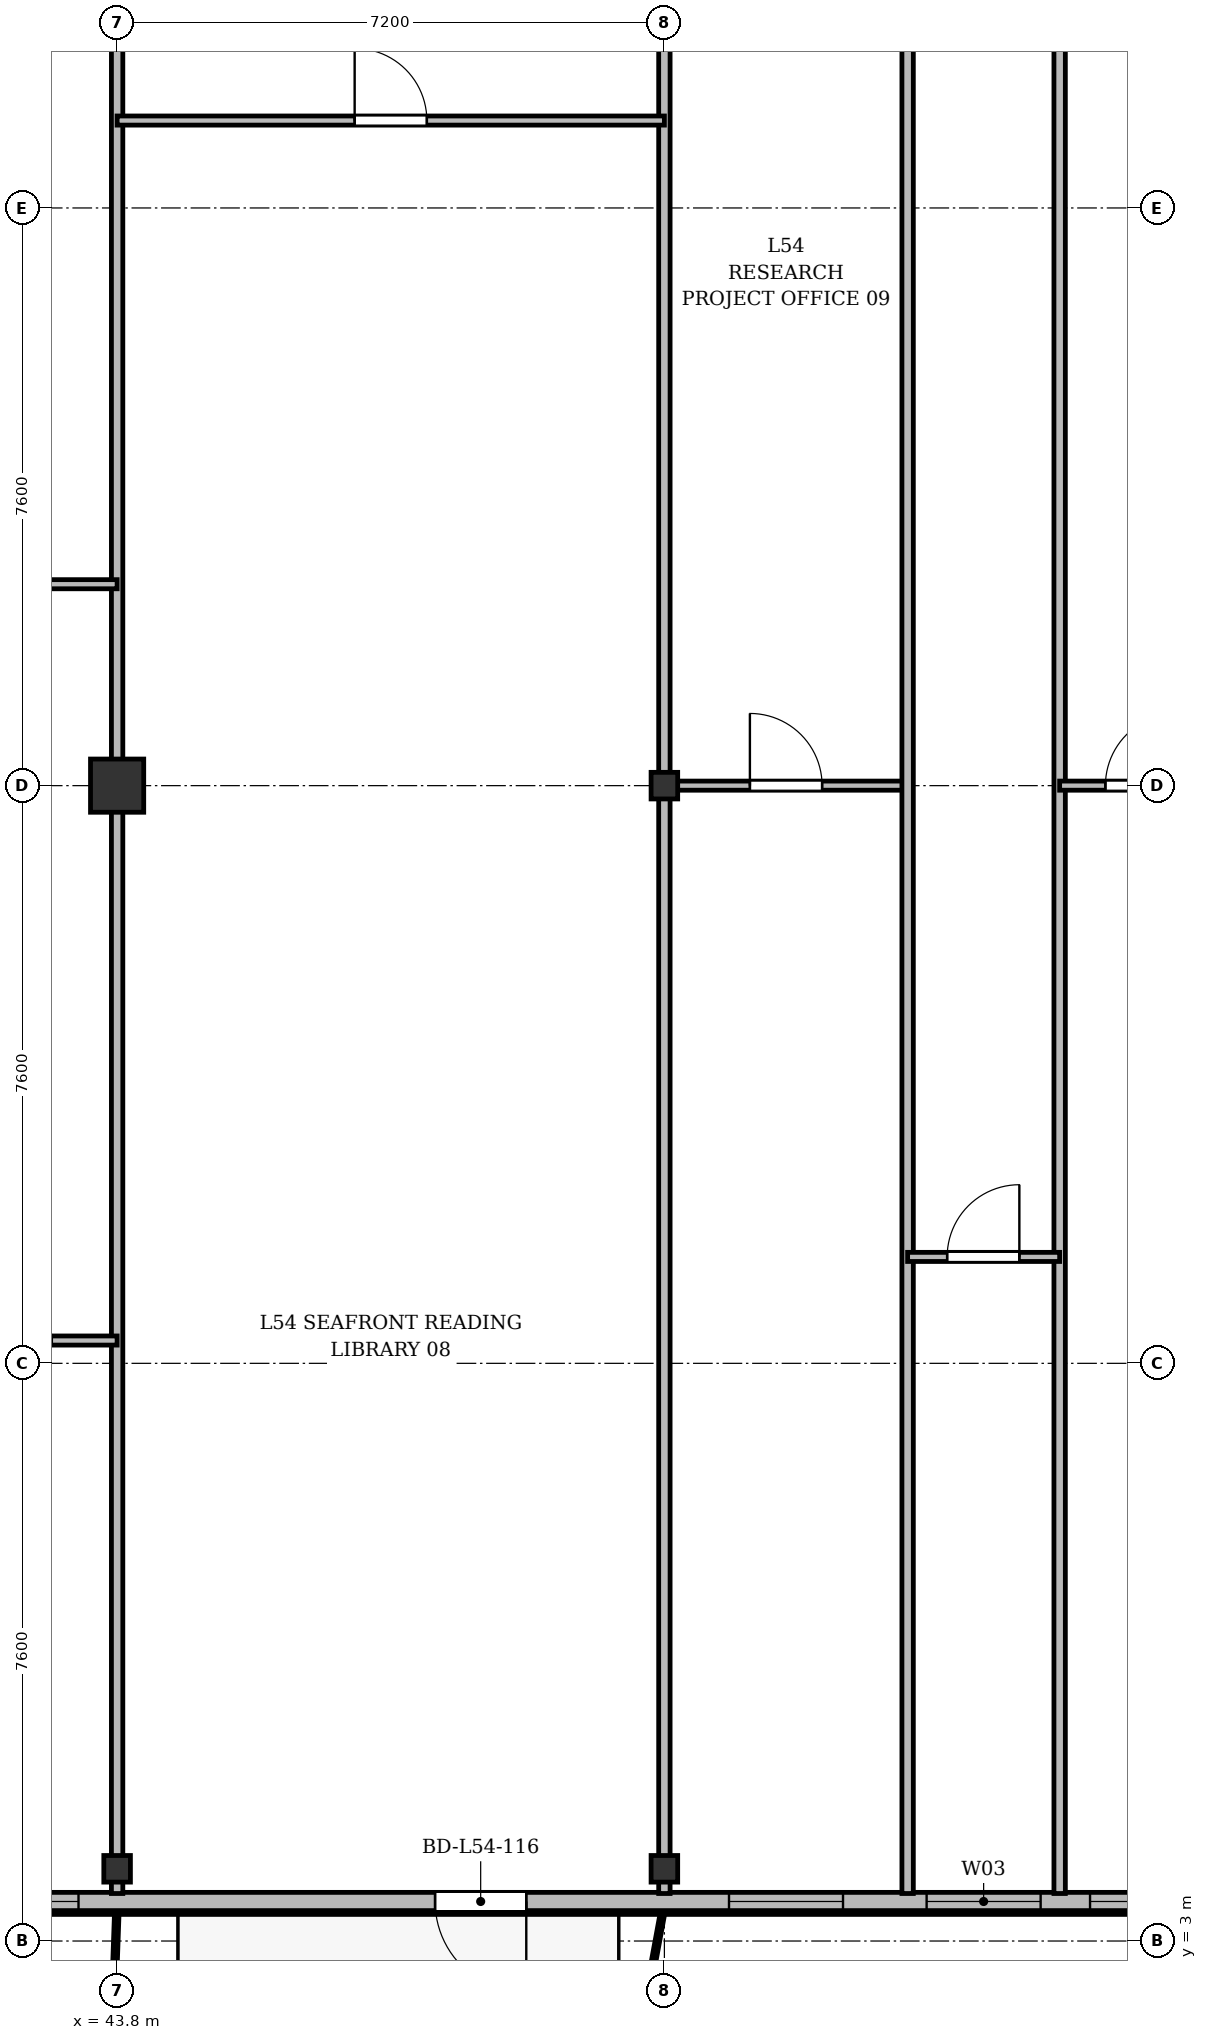
"""IFC4 building model, lengths in metres.
Left out: names, types, materials, properties, quantities, classifications, styles, units other than length and angle.
Written with IfcOpenShell. Run it as: python <this file> out.ifc"""

import sys

from ifc_helpers import new_model, si_unit, direction, frame, frame_2d, origin, origin_2d, place, context, subcontext, project, spatial, rectangle, i_section, extrude, source, transform, mapped, element, fill, save


model = new_model("IFC4")
c1 = context("Model", 3, precision=1e-05, world=origin(), true_north=direction((0.0, 1.0)))
c2 = subcontext(c1, "Body", "Model", "MODEL_VIEW")
j1 = project(units=[si_unit("LENGTHUNIT", "METRE"), si_unit("PLANEANGLEUNIT", "RADIAN")], contexts=[c1])
p1 = place(None, origin())
s1 = spatial("IfcSite", under=j1, at=p1, CompositionType="ELEMENT")
p2 = place(p1, origin())
s2 = spatial("IfcBuilding", under=s1, at=p2, CompositionType="ELEMENT")
p3 = place(p2, frame((0.0, 0.0, 208.5)))
s3 = spatial("IfcBuildingStorey", under=s2, at=p3, CompositionType="ELEMENT", Elevation=208.5)
m1 = source(origin(), c2, "Body", "SweptSolid", [
    extrude(i_section(OverallWidth=0.35, OverallDepth=0.35, WebThickness=0.018, FlangeThickness=0.028, at=origin_2d()), origin(), (0.0, 0.0, 1.0), 3.6),
])
p4 = place(p3, frame((43.8, 3.95, 0.0), z_axis=(0.0, 0.0, 1.0), x_axis=(1.0, 0.0, 0.0)))
e1 = element("IfcColumn", 1, at=p4, inside=s3, PredefinedType="COLUMN", context=c2, shape_type="MappedRepresentation", body=[
    mapped(m1, transform((0.0, 0.0, 0.0), x_axis=(1.0, 0.0, 0.0), y_axis=(0.0, 1.0, 0.0), z_axis=(0.0, 0.0, 1.0), scale=1.0)),
])
m2 = source(origin(), c2, "Body", "SweptSolid", [
    extrude(rectangle(XDim=0.7, YDim=0.7, at=origin_2d()), origin(), (0.0, 0.0, 1.0), 3.6),
])
p5 = place(p3, frame((43.8, 18.2, 0.0), z_axis=(0.0, 0.0, 1.0), x_axis=(1.0, 0.0, 0.0)))
e2 = element("IfcColumn", 2, at=p5, inside=s3, PredefinedType="COLUMN", context=c2, shape_type="MappedRepresentation", body=[
    mapped(m2, transform((0.0, 0.0, 0.0), x_axis=(1.0, 0.0, 0.0), y_axis=(0.0, 1.0, 0.0), z_axis=(0.0, 0.0, 1.0), scale=1.0)),
])
for number, where, z_axis, x_axis in (
    (3, (51.0, 3.95, 0.0), (0.0, 0.0, 1.0), (1.0, 0.0, 0.0)),
    (4, (51.0, 18.2, 0.0), (0.0, 0.0, 1.0), (1.0, 0.0, 0.0)),
):
    element("IfcColumn", number, at=place(p3, frame(where, z_axis=z_axis, x_axis=x_axis)), inside=s3, PredefinedType="COLUMN", context=c2, shape_type="MappedRepresentation", body=[
        mapped(m1, transform((0.0, 0.0, 0.0), x_axis=(1.0, 0.0, 0.0), y_axis=(0.0, 1.0, 0.0), z_axis=(0.0, 0.0, 1.0), scale=1.0)),
    ])
p6 = place(p3, frame((63.4, 3.52, 0.0), z_axis=(0.0, 0.0, 1.0), x_axis=(-1.0, 0.0, 0.0)))
e5 = element("IfcWall", 5, at=p6, inside=s3, PredefinedType="SOLIDWALL", context=c2, shape_type="SweptSolid", body=[
    extrude(rectangle(XDim=52.4, YDim=0.24, at=frame_2d((26.2, 0.0))), origin(), (0.0, 0.0, 1.0), 3.36),
])
p7 = place(p6, frame((1.52, 0.0, 0.9)))
e6 = element("IfcOpeningElement", 6, at=p7, cuts=e5, PredefinedType="OPENING", context=c2, shape_type="SweptSolid", body=[
    extrude(rectangle(XDim=1.65, YDim=1.85, at=frame_2d((0.825, 0.925))), frame((0.0, 0.13, 0.0), z_axis=(0.0, -1.0, 0.0), x_axis=(1.0, 0.0, 0.0)), (0.0, 0.0, 1.0), 0.26),
])
p8 = place(p6, frame((5.0, 0.0, 0.9)))
e7 = element("IfcOpeningElement", 7, at=p8, cuts=e5, PredefinedType="OPENING", context=c2, shape_type="SweptSolid", body=[
    extrude(rectangle(XDim=1.8, YDim=1.8, at=frame_2d((0.9, 0.9))), frame((0.0, 0.13, 0.0), z_axis=(0.0, -1.0, 0.0), x_axis=(1.0, 0.0, 0.0)), (0.0, 0.0, 1.0), 0.26),
])
p9 = place(p6, frame((7.45, 0.0, 0.9)))
e8 = element("IfcOpeningElement", 8, at=p9, cuts=e5, PredefinedType="OPENING", context=c2, shape_type="SweptSolid", body=[
    extrude(rectangle(XDim=1.5, YDim=1.75, at=frame_2d((0.75, 0.875))), frame((0.0, 0.13, 0.0), z_axis=(0.0, -1.0, 0.0), x_axis=(1.0, 0.0, 0.0)), (0.0, 0.0, 1.0), 0.26),
])
p10 = place(p6, frame((10.05, 0.0, 0.9)))
e9 = element("IfcOpeningElement", 9, at=p10, cuts=e5, PredefinedType="OPENING", context=c2, shape_type="SweptSolid", body=[
    extrude(rectangle(XDim=1.5, YDim=1.75, at=frame_2d((0.75, 0.875))), frame((0.0, 0.13, 0.0), z_axis=(0.0, -1.0, 0.0), x_axis=(1.0, 0.0, 0.0)), (0.0, 0.0, 1.0), 0.26),
])
p11 = place(p6, frame((14.217, 0.0, 0.0)))
e10 = element("IfcOpeningElement", 10, at=p11, cuts=e5, PredefinedType="OPENING", context=c2, shape_type="SweptSolid", body=[
    extrude(rectangle(XDim=1.2, YDim=2.2, at=frame_2d((0.6, 1.1))), frame((0.0, 0.13, 0.0), z_axis=(0.0, -1.0, 0.0), x_axis=(1.0, 0.0, 0.0)), (0.0, 0.0, 1.0), 0.26),
])
p12 = place(p6, frame((20.108, 0.0, 0.9)))
e11 = element("IfcOpeningElement", 11, at=p12, cuts=e5, PredefinedType="OPENING", context=c2, shape_type="SweptSolid", body=[
    extrude(rectangle(XDim=1.65, YDim=1.85, at=frame_2d((0.825, 0.925))), frame((0.0, 0.13, 0.0), z_axis=(0.0, -1.0, 0.0), x_axis=(1.0, 0.0, 0.0)), (0.0, 0.0, 1.0), 0.26),
])
p13 = place(p6, frame((22.7, 0.0, 0.9)))
e12 = element("IfcOpeningElement", 12, at=p13, cuts=e5, PredefinedType="OPENING", context=c2, shape_type="SweptSolid", body=[
    extrude(rectangle(XDim=1.8, YDim=1.8, at=frame_2d((0.9, 0.9))), frame((0.0, 0.13, 0.0), z_axis=(0.0, -1.0, 0.0), x_axis=(1.0, 0.0, 0.0)), (0.0, 0.0, 1.0), 0.26),
])
p14 = place(p6, frame((25.166, 0.0, 0.9)))
e13 = element("IfcOpeningElement", 13, at=p14, cuts=e5, PredefinedType="OPENING", context=c2, shape_type="SweptSolid", body=[
    extrude(rectangle(XDim=2.2, YDim=1.8, at=frame_2d((1.1, 0.9))), frame((0.0, 0.13, 0.0), z_axis=(0.0, -1.0, 0.0), x_axis=(1.0, 0.0, 0.0)), (0.0, 0.0, 1.0), 0.26),
])
p15 = place(p6, frame((29.45, 0.0, 0.9)))
e14 = element("IfcOpeningElement", 14, at=p15, cuts=e5, PredefinedType="OPENING", context=c2, shape_type="SweptSolid", body=[
    extrude(rectangle(XDim=1.5, YDim=1.75, at=frame_2d((0.75, 0.875))), frame((0.0, 0.13, 0.0), z_axis=(0.0, -1.0, 0.0), x_axis=(1.0, 0.0, 0.0)), (0.0, 0.0, 1.0), 0.26),
])
p16 = place(p6, frame((33.0, 0.0, 0.9)))
e15 = element("IfcOpeningElement", 15, at=p16, cuts=e5, PredefinedType="OPENING", context=c2, shape_type="SweptSolid", body=[
    extrude(rectangle(XDim=2.0, YDim=1.95, at=frame_2d((1.0, 0.975))), frame((0.0, 0.13, 0.0), z_axis=(0.0, -1.0, 0.0), x_axis=(1.0, 0.0, 0.0)), (0.0, 0.0, 1.0), 0.26),
])
p17 = place(p6, frame((35.575, 0.0, 0.9)))
e16 = element("IfcOpeningElement", 16, at=p17, cuts=e5, PredefinedType="OPENING", context=c2, shape_type="SweptSolid", body=[
    extrude(rectangle(XDim=1.65, YDim=1.85, at=frame_2d((0.825, 0.925))), frame((0.0, 0.13, 0.0), z_axis=(0.0, -1.0, 0.0), x_axis=(1.0, 0.0, 0.0)), (0.0, 0.0, 1.0), 0.26),
])
p18 = place(p6, frame((37.9, 0.0, 0.9)))
e17 = element("IfcOpeningElement", 17, at=p18, cuts=e5, PredefinedType="OPENING", context=c2, shape_type="SweptSolid", body=[
    extrude(rectangle(XDim=1.8, YDim=1.8, at=frame_2d((0.9, 0.9))), frame((0.0, 0.13, 0.0), z_axis=(0.0, -1.0, 0.0), x_axis=(1.0, 0.0, 0.0)), (0.0, 0.0, 1.0), 0.26),
])
p19 = place(p6, frame((41.456, 0.0, 0.0)))
e18 = element("IfcOpeningElement", 18, at=p19, cuts=e5, PredefinedType="OPENING", context=c2, shape_type="SweptSolid", body=[
    extrude(rectangle(XDim=1.2, YDim=2.2, at=frame_2d((0.6, 1.1))), frame((0.0, 0.13, 0.0), z_axis=(0.0, -1.0, 0.0), x_axis=(1.0, 0.0, 0.0)), (0.0, 0.0, 1.0), 0.26),
])
p20 = place(p6, frame((43.45, 0.0, 0.9)))
e19 = element("IfcOpeningElement", 19, at=p20, cuts=e5, PredefinedType="OPENING", context=c2, shape_type="SweptSolid", body=[
    extrude(rectangle(XDim=1.5, YDim=1.75, at=frame_2d((0.75, 0.875))), frame((0.0, 0.13, 0.0), z_axis=(0.0, -1.0, 0.0), x_axis=(1.0, 0.0, 0.0)), (0.0, 0.0, 1.0), 0.26),
])
p21 = place(p6, frame((45.5, 0.0, 0.9)))
e20 = element("IfcOpeningElement", 20, at=p21, cuts=e5, PredefinedType="OPENING", context=c2, shape_type="SweptSolid", body=[
    extrude(rectangle(XDim=2.0, YDim=1.95, at=frame_2d((1.0, 0.975))), frame((0.0, 0.13, 0.0), z_axis=(0.0, -1.0, 0.0), x_axis=(1.0, 0.0, 0.0)), (0.0, 0.0, 1.0), 0.26),
])
p22 = place(p6, frame((49.23, 0.0, 0.9)))
e21 = element("IfcOpeningElement", 21, at=p22, cuts=e5, PredefinedType="OPENING", context=c2, shape_type="SweptSolid", body=[
    extrude(rectangle(XDim=1.65, YDim=1.85, at=frame_2d((0.825, 0.925))), frame((0.0, 0.13, 0.0), z_axis=(0.0, -1.0, 0.0), x_axis=(1.0, 0.0, 0.0)), (0.0, 0.0, 1.0), 0.26),
])
for number, where, z_axis, x_axis in (
    (22, (43.8, 3.625, 0.0), (0.0, 0.0, 1.0), (0.0, 1.0, 0.0)),
    (23, (51.0, 3.625, 0.0), (0.0, 0.0, 1.0), (0.0, 1.0, 0.0)),
):
    element("IfcWall", number, at=place(p3, frame(where, z_axis=z_axis, x_axis=x_axis)), inside=s3, PredefinedType="PARTITIONING", context=c2, shape_type="SweptSolid", body=[
        extrude(rectangle(XDim=27.175, YDim=0.15, at=frame_2d((13.587, 0.0))), origin(), (0.0, 0.0, 1.0), 2.86),
    ])
p23 = place(p3, frame((35.8, 20.85, 0.0), z_axis=(0.0, 0.0, 1.0), x_axis=(1.0, 0.0, 0.0)))
e24 = element("IfcWall", 24, at=p23, inside=s3, PredefinedType="PARTITIONING", context=c2, shape_type="SweptSolid", body=[
    extrude(rectangle(XDim=8.0, YDim=0.12, at=frame_2d((4.0, 0.0))), origin(), (0.0, 0.0, 1.0), 2.86),
])
p24 = place(p23, frame((3.525, 0.0, 0.0)))
e25 = element("IfcOpeningElement", 25, at=p24, cuts=e24, PredefinedType="OPENING", context=c2, shape_type="SweptSolid", body=[
    extrude(rectangle(XDim=0.95, YDim=2.15, at=frame_2d((0.475, 1.075))), frame((0.0, 0.07, 0.0), z_axis=(0.0, -1.0, 0.0), x_axis=(1.0, 0.0, 0.0)), (0.0, 0.0, 1.0), 0.14),
])
p25 = place(p3, frame((41.133, 10.9, 0.0), z_axis=(0.0, 0.0, 1.0), x_axis=(1.0, 0.0, 0.0)))
e26 = element("IfcWall", 26, at=p25, inside=s3, PredefinedType="PARTITIONING", context=c2, shape_type="SweptSolid", body=[
    extrude(rectangle(XDim=2.667, YDim=0.12, at=frame_2d((1.333, 0.0))), origin(), (0.0, 0.0, 1.0), 2.86),
])
p26 = place(p25, frame((0.858, 0.0, 0.0)))
e27 = element("IfcOpeningElement", 27, at=p26, cuts=e26, PredefinedType="OPENING", context=c2, shape_type="SweptSolid", body=[
    extrude(rectangle(XDim=0.95, YDim=2.15, at=frame_2d((0.475, 1.075))), frame((0.0, 0.07, 0.0), z_axis=(0.0, -1.0, 0.0), x_axis=(1.0, 0.0, 0.0)), (0.0, 0.0, 1.0), 0.14),
])
p27 = place(p3, frame((43.8, 26.95, 0.0), z_axis=(0.0, 0.0, 1.0), x_axis=(1.0, 0.0, 0.0)))
e28 = element("IfcWall", 28, at=p27, inside=s3, PredefinedType="PARTITIONING", context=c2, shape_type="SweptSolid", body=[
    extrude(rectangle(XDim=7.2, YDim=0.12, at=frame_2d((3.6, 0.0))), origin(), (0.0, 0.0, 1.0), 2.86),
])
p28 = place(p27, frame((3.125, 0.0, 0.0)))
e29 = element("IfcOpeningElement", 29, at=p28, cuts=e28, PredefinedType="OPENING", context=c2, shape_type="SweptSolid", body=[
    extrude(rectangle(XDim=0.95, YDim=2.15, at=frame_2d((0.475, 1.075))), frame((0.0, 0.07, 0.0), z_axis=(0.0, -1.0, 0.0), x_axis=(1.0, 0.0, 0.0)), (0.0, 0.0, 1.0), 0.14),
])
p29 = place(p3, frame((51.0, 18.2, 0.0), z_axis=(0.0, 0.0, 1.0), x_axis=(1.0, 0.0, 0.0)))
e30 = element("IfcWall", 30, at=p29, inside=s3, PredefinedType="PARTITIONING", context=c2, shape_type="SweptSolid", body=[
    extrude(rectangle(XDim=3.2, YDim=0.12, at=frame_2d((1.6, 0.0))), origin(), (0.0, 0.0, 1.0), 2.91),
])
p30 = place(p29, frame((1.125, 0.0, 0.0)))
e31 = element("IfcOpeningElement", 31, at=p30, cuts=e30, PredefinedType="OPENING", context=c2, shape_type="SweptSolid", body=[
    extrude(rectangle(XDim=0.95, YDim=2.15, at=frame_2d((0.475, 1.075))), frame((0.0, 0.07, 0.0), z_axis=(0.0, -1.0, 0.0), x_axis=(1.0, 0.0, 0.0)), (0.0, 0.0, 1.0), 0.14),
])
for number, where, z_axis, x_axis in (
    (32, (54.2, 3.625, 0.0), (0.0, 0.0, 1.0), (0.0, 1.0, 0.0)),
    (33, (56.2, 3.625, 0.0), (0.0, 0.0, 1.0), (0.0, 1.0, 0.0)),
):
    element("IfcWall", number, at=place(p3, frame(where, z_axis=z_axis, x_axis=x_axis)), inside=s3, PredefinedType="PARTITIONING", context=c2, shape_type="SweptSolid", body=[
        extrude(rectangle(XDim=27.175, YDim=0.15, at=frame_2d((13.587, 0.0))), origin(), (0.0, 0.0, 1.0), 2.91),
    ])
p31 = place(p3, frame((54.2, 12.0, 0.0), z_axis=(0.0, 0.0, 1.0), x_axis=(1.0, 0.0, 0.0)))
e34 = element("IfcWall", 34, at=p31, inside=s3, PredefinedType="PARTITIONING", context=c2, shape_type="SweptSolid", body=[
    extrude(rectangle(XDim=2.0, YDim=0.12, at=frame_2d((1.0, 0.0))), origin(), (0.0, 0.0, 1.0), 3.36),
])
p32 = place(p31, frame((0.52, 0.0, 0.0)))
e35 = element("IfcOpeningElement", 35, at=p32, cuts=e34, PredefinedType="OPENING", context=c2, shape_type="SweptSolid", body=[
    extrude(rectangle(XDim=0.95, YDim=2.15, at=frame_2d((0.475, 1.075))), frame((0.0, 0.07, 0.0), z_axis=(0.0, -1.0, 0.0), x_axis=(1.0, 0.0, 0.0)), (0.0, 0.0, 1.0), 0.14),
])
p33 = place(p3, frame((56.2, 18.2, 0.0), z_axis=(0.0, 0.0, 1.0), x_axis=(1.0, 0.0, 0.0)))
e36 = element("IfcWall", 36, at=p33, inside=s3, PredefinedType="PARTITIONING", context=c2, shape_type="SweptSolid", body=[
    extrude(rectangle(XDim=2.6, YDim=0.12, at=frame_2d((1.3, 0.0))), origin(), (0.0, 0.0, 1.0), 2.91),
])
p34 = place(p33, frame((0.602, 0.0, 0.0)))
e37 = element("IfcOpeningElement", 37, at=p34, cuts=e36, PredefinedType="OPENING", context=c2, shape_type="SweptSolid", body=[
    extrude(rectangle(XDim=0.95, YDim=2.15, at=frame_2d((0.475, 1.075))), frame((0.0, 0.07, 0.0), z_axis=(0.0, -1.0, 0.0), x_axis=(1.0, 0.0, 0.0)), (0.0, 0.0, 1.0), 0.14),
])
m3 = source(origin(), c2, "Body", "SweptSolid", [
    extrude(rectangle(XDim=1.8, YDim=1.8, at=frame_2d((0.9, 0.9))), frame((0.0, 0.03, 0.0), z_axis=(0.0, -1.0, 0.0), x_axis=(1.0, 0.0, 0.0)), (0.0, 0.0, 1.0), 0.06),
])
p35 = place(p8, origin())
e38 = element("IfcWindow", 38, at=p35, inside=s3, PartitioningType="SINGLE_PANEL", PredefinedType="WINDOW", context=c2, shape_type="MappedRepresentation", body=[
    mapped(m3, transform((0.0, 0.0, 0.0), x_axis=(1.0, 0.0, 0.0), y_axis=(0.0, 1.0, 0.0), z_axis=(0.0, 0.0, 1.0), scale=1.0)),
])
fill(e7, e38)
m4 = source(origin(), c2, "Body", "SweptSolid", [
    extrude(rectangle(XDim=1.5, YDim=1.75, at=frame_2d((0.75, 0.875))), frame((0.0, 0.03, 0.0), z_axis=(0.0, -1.0, 0.0), x_axis=(1.0, 0.0, 0.0)), (0.0, 0.0, 1.0), 0.06),
])
p36 = place(p9, origin())
e39 = element("IfcWindow", 39, at=p36, inside=s3, PartitioningType="SINGLE_PANEL", PredefinedType="WINDOW", context=c2, shape_type="MappedRepresentation", body=[
    mapped(m4, transform((0.0, 0.0, 0.0), x_axis=(1.0, 0.0, 0.0), y_axis=(0.0, 1.0, 0.0), z_axis=(0.0, 0.0, 1.0), scale=1.0)),
])
fill(e8, e39)
p37 = place(p10, origin())
e40 = element("IfcWindow", 40, at=p37, inside=s3, PartitioningType="SINGLE_PANEL", PredefinedType="WINDOW", context=c2, shape_type="MappedRepresentation", body=[
    mapped(m4, transform((0.0, 0.0, 0.0), x_axis=(1.0, 0.0, 0.0), y_axis=(0.0, 1.0, 0.0), z_axis=(0.0, 0.0, 1.0), scale=1.0)),
])
fill(e9, e40)
m5 = source(origin(), c2, "Body", "SweptSolid", [
    extrude(rectangle(XDim=1.2, YDim=2.2, at=frame_2d((0.6, 1.1))), frame((0.0, 0.025, 0.0), z_axis=(0.0, -1.0, 0.0), x_axis=(1.0, 0.0, 0.0)), (0.0, 0.0, 1.0), 0.05),
])
p38 = place(p11, origin())
e41 = element("IfcDoor", 41, at=p38, inside=s3, OperationType="SINGLE_SWING_LEFT", PredefinedType="DOOR", context=c2, shape_type="MappedRepresentation", body=[
    mapped(m5, transform((0.0, 0.0, 0.0), x_axis=(1.0, 0.0, 0.0), y_axis=(0.0, 1.0, 0.0), z_axis=(0.0, 0.0, 1.0), scale=1.0)),
])
fill(e10, e41)
m6 = source(origin(), c2, "Body", "SweptSolid", [
    extrude(rectangle(XDim=1.65, YDim=1.85, at=frame_2d((0.825, 0.925))), frame((0.0, 0.03, 0.0), z_axis=(0.0, -1.0, 0.0), x_axis=(1.0, 0.0, 0.0)), (0.0, 0.0, 1.0), 0.06),
])
p39 = place(p12, origin())
e42 = element("IfcWindow", 42, at=p39, inside=s3, PartitioningType="SINGLE_PANEL", PredefinedType="WINDOW", context=c2, shape_type="MappedRepresentation", body=[
    mapped(m6, transform((0.0, 0.0, 0.0), x_axis=(1.0, 0.0, 0.0), y_axis=(0.0, 1.0, 0.0), z_axis=(0.0, 0.0, 1.0), scale=1.0)),
])
fill(e11, e42)
m7 = source(origin(), c2, "Body", "SweptSolid", [
    extrude(rectangle(XDim=0.95, YDim=2.15, at=frame_2d((0.475, 1.075))), frame((0.0, 0.025, 0.0), z_axis=(0.0, -1.0, 0.0), x_axis=(1.0, 0.0, 0.0)), (0.0, 0.0, 1.0), 0.05),
])
p40 = place(p28, origin())
e43 = element("IfcDoor", 43, at=p40, inside=s3, OperationType="SINGLE_SWING_LEFT", PredefinedType="DOOR", context=c2, shape_type="MappedRepresentation", body=[
    mapped(m7, transform((0.0, 0.0, 0.0), x_axis=(1.0, 0.0, 0.0), y_axis=(0.0, 1.0, 0.0), z_axis=(0.0, 0.0, 1.0), scale=1.0)),
])
fill(e29, e43)
p41 = place(p30, origin())
e44 = element("IfcDoor", 44, at=p41, inside=s3, OperationType="SINGLE_SWING_LEFT", PredefinedType="DOOR", context=c2, shape_type="MappedRepresentation", body=[
    mapped(m7, transform((0.0, 0.0, 0.0), x_axis=(1.0, 0.0, 0.0), y_axis=(0.0, 1.0, 0.0), z_axis=(0.0, 0.0, 1.0), scale=1.0)),
])
fill(e31, e44)
p42 = place(p32, origin())
e45 = element("IfcDoor", 45, at=p42, inside=s3, OperationType="SINGLE_SWING_RIGHT", PredefinedType="DOOR", context=c2, shape_type="MappedRepresentation", body=[
    mapped(m7, transform((0.0, 0.0, 0.0), x_axis=(1.0, 0.0, 0.0), y_axis=(0.0, 1.0, 0.0), z_axis=(0.0, 0.0, 1.0), scale=1.0)),
])
fill(e35, e45)
p43 = place(p34, origin())
e46 = element("IfcDoor", 46, at=p43, inside=s3, OperationType="SINGLE_SWING_RIGHT", PredefinedType="DOOR", context=c2, shape_type="MappedRepresentation", body=[
    mapped(m7, transform((0.0, 0.0, 0.0), x_axis=(1.0, 0.0, 0.0), y_axis=(0.0, 1.0, 0.0), z_axis=(0.0, 0.0, 1.0), scale=1.0)),
])
fill(e37, e46)
save(model, sys.argv[1])
